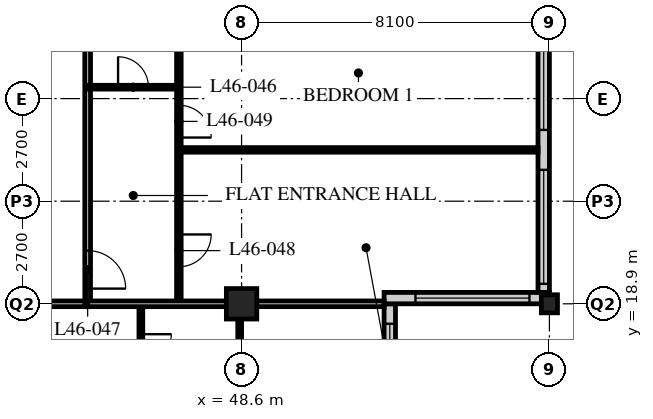
"""IFC4 building model, lengths in metres.
Left out: names, types, materials, properties, quantities, classifications, styles, units other than length and angle.
Written with IfcOpenShell. Run it as: python <this file> out.ifc"""

import sys

from ifc_helpers import new_model, si_unit, direction, frame, frame_2d, origin, origin_2d, place, context, subcontext, project, spatial, rectangle, hollow_rectangle, i_section, extrude, element, fill, save


model = new_model("IFC4")
c1 = context("Model", 3, precision=1e-05, world=origin(), true_north=direction((0.0, 1.0)))
c2 = subcontext(c1, "Body", "Model", "MODEL_VIEW")
j1 = project(units=[si_unit("LENGTHUNIT", "METRE"), si_unit("PLANEANGLEUNIT", "RADIAN")], contexts=[c1])
p1 = place(None, origin())
s1 = spatial("IfcSite", under=j1, at=p1, CompositionType="ELEMENT")
p2 = place(p1, origin())
s2 = spatial("IfcBuilding", under=s1, at=p2, CompositionType="ELEMENT")
p3 = place(p2, frame((0.0, 0.0, 181.2)))
s3 = spatial("IfcBuildingStorey", under=s2, at=p3, CompositionType="ELEMENT", Elevation=181.2)
p4 = place(p3, frame((48.6, 18.9, 0.0), z_axis=(0.0, 0.0, 1.0), x_axis=(1.0, 0.0, 0.0)))
e1 = element("IfcColumn", 1, at=p4, inside=s3, PredefinedType="COLUMN", context=c2, shape_type="SweptSolid", body=[
    extrude(hollow_rectangle(XDim=0.8, YDim=0.8, WallThickness=0.08, at=origin_2d()), origin(), (0.0, 0.0, 1.0), 3.6),
])
p5 = place(p3, frame((56.7, 18.9, 0.0), z_axis=(0.0, 0.0, 1.0), x_axis=(1.0, 0.0, 0.0)))
e2 = element("IfcColumn", 2, at=p5, inside=s3, PredefinedType="COLUMN", context=c2, shape_type="SweptSolid", body=[
    extrude(i_section(OverallWidth=0.424, OverallDepth=0.475, WebThickness=0.048, FlangeThickness=0.077, FilletRadius=0.015, at=origin_2d()), origin(), (0.0, 0.0, 1.0), 3.6),
])
p6 = place(p3, frame((52.5, 15.15, 0.0), z_axis=(0.0, 0.0, 1.0), x_axis=(0.0, 1.0, 0.0)))
e3 = element("IfcWall", 3, at=p6, inside=s3, PredefinedType="SOLIDWALL", context=c2, shape_type="SweptSolid", body=[
    extrude(rectangle(XDim=3.75, YDim=0.3, at=frame_2d((1.875, 0.0))), origin(), (0.0, 0.0, 1.0), 3.39),
])
p7 = place(p6, frame((0.225, 0.0, 0.6)))
e4 = element("IfcOpeningElement", 4, at=p7, cuts=e3, PredefinedType="OPENING", context=c2, shape_type="SweptSolid", body=[
    extrude(rectangle(XDim=3.0, YDim=2.0, at=frame_2d((1.5, 1.0))), frame((0.0, 0.16, 0.0), z_axis=(0.0, -1.0, 0.0), x_axis=(1.0, 0.0, 0.0)), (0.0, 0.0, 1.0), 0.32),
])
p8 = place(p3, frame((52.35, 19.05, 0.0), z_axis=(0.0, 0.0, 1.0), x_axis=(1.0, 0.0, 0.0)))
e5 = element("IfcWall", 5, at=p8, inside=s3, PredefinedType="SOLIDWALL", context=c2, shape_type="SweptSolid", body=[
    extrude(rectangle(XDim=4.35, YDim=0.3, at=frame_2d((2.175, 0.0))), origin(), (0.0, 0.0, 1.0), 3.39),
])
p9 = place(p8, frame((0.825, 0.0, 0.6)))
e6 = element("IfcOpeningElement", 6, at=p9, cuts=e5, PredefinedType="OPENING", context=c2, shape_type="SweptSolid", body=[
    extrude(rectangle(XDim=3.0, YDim=2.0, at=frame_2d((1.5, 1.0))), frame((0.0, 0.16, 0.0), z_axis=(0.0, -1.0, 0.0), x_axis=(1.0, 0.0, 0.0)), (0.0, 0.0, 1.0), 0.32),
])
p10 = place(p3, frame((56.55, 19.2, 0.0), z_axis=(0.0, 0.0, 1.0), x_axis=(0.0, 1.0, 0.0)))
e7 = element("IfcWall", 7, at=p10, inside=s3, PredefinedType="SOLIDWALL", context=c2, shape_type="SweptSolid", body=[
    extrude(rectangle(XDim=32.1, YDim=0.3, at=frame_2d((16.05, 0.0))), origin(), (0.0, 0.0, 1.0), 3.39),
])
p11 = place(p10, frame((0.225, 0.0, 0.6)))
e8 = element("IfcOpeningElement", 8, at=p11, cuts=e7, PredefinedType="OPENING", context=c2, shape_type="SweptSolid", body=[
    extrude(rectangle(XDim=3.0, YDim=2.4, at=frame_2d((1.5, 1.2))), frame((0.0, 0.16, 0.0), z_axis=(0.0, -1.0, 0.0), x_axis=(1.0, 0.0, 0.0)), (0.0, 0.0, 1.0), 0.32),
])
p12 = place(p10, frame((4.275, 0.0, 0.6)))
e9 = element("IfcOpeningElement", 9, at=p12, cuts=e7, PredefinedType="OPENING", context=c2, shape_type="SweptSolid", body=[
    extrude(rectangle(XDim=3.0, YDim=2.4, at=frame_2d((1.5, 1.2))), frame((0.0, 0.16, 0.0), z_axis=(0.0, -1.0, 0.0), x_axis=(1.0, 0.0, 0.0)), (0.0, 0.0, 1.0), 0.32),
])
p13 = place(p10, frame((8.325, 0.0, 0.6)))
e10 = element("IfcOpeningElement", 10, at=p13, cuts=e7, PredefinedType="OPENING", context=c2, shape_type="SweptSolid", body=[
    extrude(rectangle(XDim=3.0, YDim=2.4, at=frame_2d((1.5, 1.2))), frame((0.0, 0.16, 0.0), z_axis=(0.0, -1.0, 0.0), x_axis=(1.0, 0.0, 0.0)), (0.0, 0.0, 1.0), 0.32),
])
p14 = place(p10, frame((12.375, 0.0, 0.6)))
e11 = element("IfcOpeningElement", 11, at=p14, cuts=e7, PredefinedType="OPENING", context=c2, shape_type="SweptSolid", body=[
    extrude(rectangle(XDim=3.0, YDim=2.4, at=frame_2d((1.5, 1.2))), frame((0.0, 0.16, 0.0), z_axis=(0.0, -1.0, 0.0), x_axis=(1.0, 0.0, 0.0)), (0.0, 0.0, 1.0), 0.32),
])
p15 = place(p10, frame((16.425, 0.0, 0.6)))
e12 = element("IfcOpeningElement", 12, at=p15, cuts=e7, PredefinedType="OPENING", context=c2, shape_type="SweptSolid", body=[
    extrude(rectangle(XDim=3.0, YDim=2.4, at=frame_2d((1.5, 1.2))), frame((0.0, 0.16, 0.0), z_axis=(0.0, -1.0, 0.0), x_axis=(1.0, 0.0, 0.0)), (0.0, 0.0, 1.0), 0.32),
])
p16 = place(p10, frame((20.475, 0.0, 0.6)))
e13 = element("IfcOpeningElement", 13, at=p16, cuts=e7, PredefinedType="OPENING", context=c2, shape_type="SweptSolid", body=[
    extrude(rectangle(XDim=3.0, YDim=2.4, at=frame_2d((1.5, 1.2))), frame((0.0, 0.16, 0.0), z_axis=(0.0, -1.0, 0.0), x_axis=(1.0, 0.0, 0.0)), (0.0, 0.0, 1.0), 0.32),
])
p17 = place(p10, frame((24.525, 0.0, 0.6)))
e14 = element("IfcOpeningElement", 14, at=p17, cuts=e7, PredefinedType="OPENING", context=c2, shape_type="SweptSolid", body=[
    extrude(rectangle(XDim=3.0, YDim=2.4, at=frame_2d((1.5, 1.2))), frame((0.0, 0.16, 0.0), z_axis=(0.0, -1.0, 0.0), x_axis=(1.0, 0.0, 0.0)), (0.0, 0.0, 1.0), 0.32),
])
p18 = place(p10, frame((28.575, 0.0, 0.6)))
e15 = element("IfcOpeningElement", 15, at=p18, cuts=e7, PredefinedType="OPENING", context=c2, shape_type="SweptSolid", body=[
    extrude(rectangle(XDim=3.0, YDim=2.4, at=frame_2d((1.5, 1.2))), frame((0.0, 0.16, 0.0), z_axis=(0.0, -1.0, 0.0), x_axis=(1.0, 0.0, 0.0)), (0.0, 0.0, 1.0), 0.32),
])
p19 = place(p3, frame((12.15, 18.9, 0.0), z_axis=(0.0, 0.0, 1.0), x_axis=(1.0, 0.0, 0.0)))
e16 = element("IfcWall", 16, at=p19, inside=s3, PredefinedType="PARTITIONING", context=c2, shape_type="SweptSolid", body=[
    extrude(rectangle(XDim=32.4, YDim=0.15, at=frame_2d((16.2, 0.0))), origin(), (0.0, 0.0, 1.0), 2.778),
])
p20 = place(p19, frame((4.95, 0.0, 0.0)))
e17 = element("IfcOpeningElement", 17, at=p20, cuts=e16, PredefinedType="OPENING", context=c2, shape_type="SweptSolid", body=[
    extrude(rectangle(XDim=1.0, YDim=2.1, at=frame_2d((0.5, 1.05))), frame((0.0, 0.085, 0.0), z_axis=(0.0, -1.0, 0.0), x_axis=(1.0, 0.0, 0.0)), (0.0, 0.0, 1.0), 0.17),
])
p21 = place(p19, frame((13.05, 0.0, 0.0)))
e18 = element("IfcOpeningElement", 18, at=p21, cuts=e16, PredefinedType="OPENING", context=c2, shape_type="SweptSolid", body=[
    extrude(rectangle(XDim=1.0, YDim=2.1, at=frame_2d((0.5, 1.05))), frame((0.0, 0.085, 0.0), z_axis=(0.0, -1.0, 0.0), x_axis=(1.0, 0.0, 0.0)), (0.0, 0.0, 1.0), 0.17),
])
p22 = place(p19, frame((21.15, 0.0, 0.0)))
e19 = element("IfcOpeningElement", 19, at=p22, cuts=e16, PredefinedType="OPENING", context=c2, shape_type="SweptSolid", body=[
    extrude(rectangle(XDim=1.0, YDim=2.1, at=frame_2d((0.5, 1.05))), frame((0.0, 0.085, 0.0), z_axis=(0.0, -1.0, 0.0), x_axis=(1.0, 0.0, 0.0)), (0.0, 0.0, 1.0), 0.17),
])
p23 = place(p19, frame((1.525, 0.0, 0.0)))
e20 = element("IfcOpeningElement", 20, at=p23, cuts=e16, PredefinedType="OPENING", context=c2, shape_type="SweptSolid", body=[
    extrude(rectangle(XDim=1.0, YDim=2.1, at=frame_2d((0.5, 1.05))), frame((0.0, 0.085, 0.0), z_axis=(0.0, -1.0, 0.0), x_axis=(1.0, 0.0, 0.0)), (0.0, 0.0, 1.0), 0.17),
])
p24 = place(p19, frame((29.875, 0.0, 0.0)))
e21 = element("IfcOpeningElement", 21, at=p24, cuts=e16, PredefinedType="OPENING", context=c2, shape_type="SweptSolid", body=[
    extrude(rectangle(XDim=1.0, YDim=2.1, at=frame_2d((0.5, 1.05))), frame((0.0, 0.085, 0.0), z_axis=(0.0, -1.0, 0.0), x_axis=(1.0, 0.0, 0.0)), (0.0, 0.0, 1.0), 0.17),
])
p25 = place(p3, frame((44.55, 18.9, 0.0), z_axis=(0.0, 0.0, 1.0), x_axis=(0.0, 1.0, 0.0)))
e22 = element("IfcWall", 22, at=p25, inside=s3, PredefinedType="PARTITIONING", context=c2, shape_type="SweptSolid", body=[
    extrude(rectangle(XDim=28.35, YDim=0.15, at=frame_2d((14.175, 0.0))), origin(), (0.0, 0.0, 1.0), 3.39),
])
p26 = place(p25, frame((0.4, 0.0, 0.0)))
e23 = element("IfcOpeningElement", 23, at=p26, cuts=e22, PredefinedType="OPENING", context=c2, shape_type="SweptSolid", body=[
    extrude(rectangle(XDim=1.0, YDim=2.1, at=frame_2d((0.5, 1.05))), frame((0.0, 0.085, 0.0), z_axis=(0.0, -1.0, 0.0), x_axis=(1.0, 0.0, 0.0)), (0.0, 0.0, 1.0), 0.17),
])
p27 = place(p25, frame((10.45, 0.0, 0.0)))
e24 = element("IfcOpeningElement", 24, at=p27, cuts=e22, PredefinedType="OPENING", context=c2, shape_type="SweptSolid", body=[
    extrude(rectangle(XDim=1.0, YDim=2.1, at=frame_2d((0.5, 1.05))), frame((0.0, 0.085, 0.0), z_axis=(0.0, -1.0, 0.0), x_axis=(1.0, 0.0, 0.0)), (0.0, 0.0, 1.0), 0.17),
])
p28 = place(p25, frame((14.5, 0.0, 0.0)))
e25 = element("IfcOpeningElement", 25, at=p28, cuts=e22, PredefinedType="OPENING", context=c2, shape_type="SweptSolid", body=[
    extrude(rectangle(XDim=1.0, YDim=2.1, at=frame_2d((0.5, 1.05))), frame((0.0, 0.085, 0.0), z_axis=(0.0, -1.0, 0.0), x_axis=(1.0, 0.0, 0.0)), (0.0, 0.0, 1.0), 0.17),
])
p29 = place(p25, frame((16.6, 0.0, 0.0)))
e26 = element("IfcOpeningElement", 26, at=p29, cuts=e22, PredefinedType="OPENING", context=c2, shape_type="SweptSolid", body=[
    extrude(rectangle(XDim=1.0, YDim=2.1, at=frame_2d((0.5, 1.05))), frame((0.0, 0.085, 0.0), z_axis=(0.0, -1.0, 0.0), x_axis=(1.0, 0.0, 0.0)), (0.0, 0.0, 1.0), 0.17),
])
p30 = place(p25, frame((26.65, 0.0, 0.0)))
e27 = element("IfcOpeningElement", 27, at=p30, cuts=e22, PredefinedType="OPENING", context=c2, shape_type="SweptSolid", body=[
    extrude(rectangle(XDim=1.0, YDim=2.1, at=frame_2d((0.5, 1.05))), frame((0.0, 0.085, 0.0), z_axis=(0.0, -1.0, 0.0), x_axis=(1.0, 0.0, 0.0)), (0.0, 0.0, 1.0), 0.17),
])
p31 = place(p3, frame((46.95, 18.9, 0.0), z_axis=(0.0, 0.0, 1.0), x_axis=(0.0, 1.0, 0.0)))
e28 = element("IfcWall", 28, at=p31, inside=s3, PredefinedType="PARTITIONING", context=c2, shape_type="SweptSolid", body=[
    extrude(rectangle(XDim=8.1, YDim=0.12, at=frame_2d((4.05, 0.0))), origin(), (0.0, 0.0, 1.0), 3.39),
])
p32 = place(p31, frame((0.975, 0.0, 0.0)))
e29 = element("IfcOpeningElement", 29, at=p32, cuts=e28, PredefinedType="OPENING", context=c2, shape_type="SweptSolid", body=[
    extrude(rectangle(XDim=0.85, YDim=2.1, at=frame_2d((0.425, 1.05))), frame((0.0, 0.07, 0.0), z_axis=(0.0, -1.0, 0.0), x_axis=(1.0, 0.0, 0.0)), (0.0, 0.0, 1.0), 0.14),
])
p33 = place(p31, frame((4.375, 0.0, 0.0)))
e30 = element("IfcOpeningElement", 30, at=p33, cuts=e28, PredefinedType="OPENING", context=c2, shape_type="SweptSolid", body=[
    extrude(rectangle(XDim=0.85, YDim=2.1, at=frame_2d((0.425, 1.05))), frame((0.0, 0.07, 0.0), z_axis=(0.0, -1.0, 0.0), x_axis=(1.0, 0.0, 0.0)), (0.0, 0.0, 1.0), 0.14),
])
p34 = place(p3, frame((44.55, 24.6, 0.0), z_axis=(0.0, 0.0, 1.0), x_axis=(1.0, 0.0, 0.0)))
e31 = element("IfcWall", 31, at=p34, inside=s3, PredefinedType="PARTITIONING", context=c2, shape_type="SweptSolid", body=[
    extrude(rectangle(XDim=2.4, YDim=0.1, at=frame_2d((1.2, 0.0))), origin(), (0.0, 0.0, 1.0), 3.39),
])
p35 = place(p34, frame((0.8, 0.0, 0.0)))
e32 = element("IfcOpeningElement", 32, at=p35, cuts=e31, PredefinedType="OPENING", context=c2, shape_type="SweptSolid", body=[
    extrude(rectangle(XDim=0.8, YDim=2.1, at=frame_2d((0.4, 1.05))), frame((0.0, 0.06, 0.0), z_axis=(0.0, -1.0, 0.0), x_axis=(1.0, 0.0, 0.0)), (0.0, 0.0, 1.0), 0.12),
])
p36 = place(p3, frame((46.95, 22.95, 0.0), z_axis=(0.0, 0.0, 1.0), x_axis=(1.0, 0.0, 0.0)))
e33 = element("IfcWall", 33, at=p36, inside=s3, PredefinedType="PARTITIONING", context=c2, shape_type="SweptSolid", body=[
    extrude(rectangle(XDim=9.45, YDim=0.12, at=frame_2d((4.725, 0.0))), origin(), (0.0, 0.0, 1.0), 3.39),
])
p37 = place(p3, frame((45.95, 18.9, 0.0), z_axis=(0.0, 0.0, 1.0), x_axis=(0.0, -1.0, 0.0)))
e34 = element("IfcWall", 34, at=p37, inside=s3, PredefinedType="PARTITIONING", context=c2, shape_type="SweptSolid", body=[
    extrude(rectangle(XDim=2.4, YDim=0.1, at=frame_2d((1.2, 0.0))), origin(), (0.0, 0.0, 1.0), 3.39),
])
p38 = place(p37, frame((0.8, 0.0, 0.0)))
e35 = element("IfcOpeningElement", 35, at=p38, cuts=e34, PredefinedType="OPENING", context=c2, shape_type="SweptSolid", body=[
    extrude(rectangle(XDim=0.8, YDim=2.1, at=frame_2d((0.4, 1.05))), frame((0.0, 0.06, 0.0), z_axis=(0.0, -1.0, 0.0), x_axis=(1.0, 0.0, 0.0)), (0.0, 0.0, 1.0), 0.12),
])
p39 = place(p3, frame((48.55, 18.9, 0.0), z_axis=(0.0, 0.0, 1.0), x_axis=(0.0, -1.0, 0.0)))
e36 = element("IfcWall", 36, at=p39, inside=s3, PredefinedType="PARTITIONING", context=c2, shape_type="SweptSolid", body=[
    extrude(rectangle(XDim=2.4, YDim=0.1, at=frame_2d((1.2, 0.0))), origin(), (0.0, 0.0, 1.0), 2.778),
])
p40 = place(p3, frame((44.55, 18.9, 0.0), z_axis=(0.0, 0.0, 1.0), x_axis=(1.0, 0.0, 0.0)))
e37 = element("IfcWall", 37, at=p40, inside=s3, PredefinedType="PARTITIONING", context=c2, shape_type="SweptSolid", body=[
    extrude(rectangle(XDim=7.8, YDim=0.15, at=frame_2d((3.9, 0.0))), origin(), (0.0, 0.0, 1.0), 2.778),
])
p41 = place(p7, origin())
e38 = element("IfcWindow", 38, at=p41, inside=s3, PartitioningType="SINGLE_PANEL", PredefinedType="WINDOW", context=c2, shape_type="SweptSolid", body=[
    extrude(rectangle(XDim=3.0, YDim=2.0, at=frame_2d((1.5, 1.0))), frame((0.0, 0.03, 0.0), z_axis=(0.0, -1.0, 0.0), x_axis=(1.0, 0.0, 0.0)), (0.0, 0.0, 1.0), 0.06),
])
fill(e4, e38)
p42 = place(p9, origin())
e39 = element("IfcWindow", 39, at=p42, inside=s3, PartitioningType="SINGLE_PANEL", PredefinedType="WINDOW", context=c2, shape_type="SweptSolid", body=[
    extrude(rectangle(XDim=3.0, YDim=2.0, at=frame_2d((1.5, 1.0))), frame((0.0, 0.03, 0.0), z_axis=(0.0, -1.0, 0.0), x_axis=(1.0, 0.0, 0.0)), (0.0, 0.0, 1.0), 0.06),
])
fill(e6, e39)
p43 = place(p11, origin())
e40 = element("IfcWindow", 40, at=p43, inside=s3, PartitioningType="SINGLE_PANEL", PredefinedType="WINDOW", context=c2, shape_type="SweptSolid", body=[
    extrude(rectangle(XDim=3.0, YDim=2.4, at=frame_2d((1.5, 1.2))), frame((0.0, 0.03, 0.0), z_axis=(0.0, -1.0, 0.0), x_axis=(1.0, 0.0, 0.0)), (0.0, 0.0, 1.0), 0.06),
])
fill(e8, e40)
p44 = place(p12, origin())
e41 = element("IfcWindow", 41, at=p44, inside=s3, PartitioningType="SINGLE_PANEL", PredefinedType="WINDOW", context=c2, shape_type="SweptSolid", body=[
    extrude(rectangle(XDim=3.0, YDim=2.4, at=frame_2d((1.5, 1.2))), frame((0.0, 0.03, 0.0), z_axis=(0.0, -1.0, 0.0), x_axis=(1.0, 0.0, 0.0)), (0.0, 0.0, 1.0), 0.06),
])
fill(e9, e41)
p45 = place(p35, origin())
e42 = element("IfcDoor", 42, at=p45, inside=s3, OperationType="SINGLE_SWING_LEFT", PredefinedType="DOOR", context=c2, shape_type="SweptSolid", body=[
    extrude(rectangle(XDim=0.8, YDim=2.1, at=frame_2d((0.4, 1.05))), frame((0.0, 0.025, 0.0), z_axis=(0.0, -1.0, 0.0), x_axis=(1.0, 0.0, 0.0)), (0.0, 0.0, 1.0), 0.05),
])
fill(e32, e42)
p46 = place(p26, origin())
e43 = element("IfcDoor", 43, at=p46, inside=s3, OperationType="SINGLE_SWING_RIGHT", PredefinedType="DOOR", context=c2, shape_type="SweptSolid", body=[
    extrude(rectangle(XDim=1.0, YDim=2.1, at=frame_2d((0.5, 1.05))), frame((0.0, 0.025, 0.0), z_axis=(0.0, -1.0, 0.0), x_axis=(1.0, 0.0, 0.0)), (0.0, 0.0, 1.0), 0.05),
])
fill(e23, e43)
p47 = place(p32, origin())
e44 = element("IfcDoor", 44, at=p47, inside=s3, OperationType="SINGLE_SWING_LEFT", PredefinedType="DOOR", context=c2, shape_type="SweptSolid", body=[
    extrude(rectangle(XDim=0.85, YDim=2.1, at=frame_2d((0.425, 1.05))), frame((0.0, 0.025, 0.0), z_axis=(0.0, -1.0, 0.0), x_axis=(1.0, 0.0, 0.0)), (0.0, 0.0, 1.0), 0.05),
])
fill(e29, e44)
p48 = place(p33, origin())
e45 = element("IfcDoor", 45, at=p48, inside=s3, OperationType="SINGLE_SWING_RIGHT", PredefinedType="DOOR", context=c2, shape_type="SweptSolid", body=[
    extrude(rectangle(XDim=0.85, YDim=2.1, at=frame_2d((0.425, 1.05))), frame((0.0, 0.025, 0.0), z_axis=(0.0, -1.0, 0.0), x_axis=(1.0, 0.0, 0.0)), (0.0, 0.0, 1.0), 0.05),
])
fill(e30, e45)
p49 = place(p38, origin())
e46 = element("IfcDoor", 46, at=p49, inside=s3, OperationType="SINGLE_SWING_LEFT", PredefinedType="DOOR", context=c2, shape_type="SweptSolid", body=[
    extrude(rectangle(XDim=0.8, YDim=2.1, at=frame_2d((0.4, 1.05))), frame((0.0, 0.025, 0.0), z_axis=(0.0, -1.0, 0.0), x_axis=(1.0, 0.0, 0.0)), (0.0, 0.0, 1.0), 0.05),
])
fill(e35, e46)
save(model, sys.argv[1])
